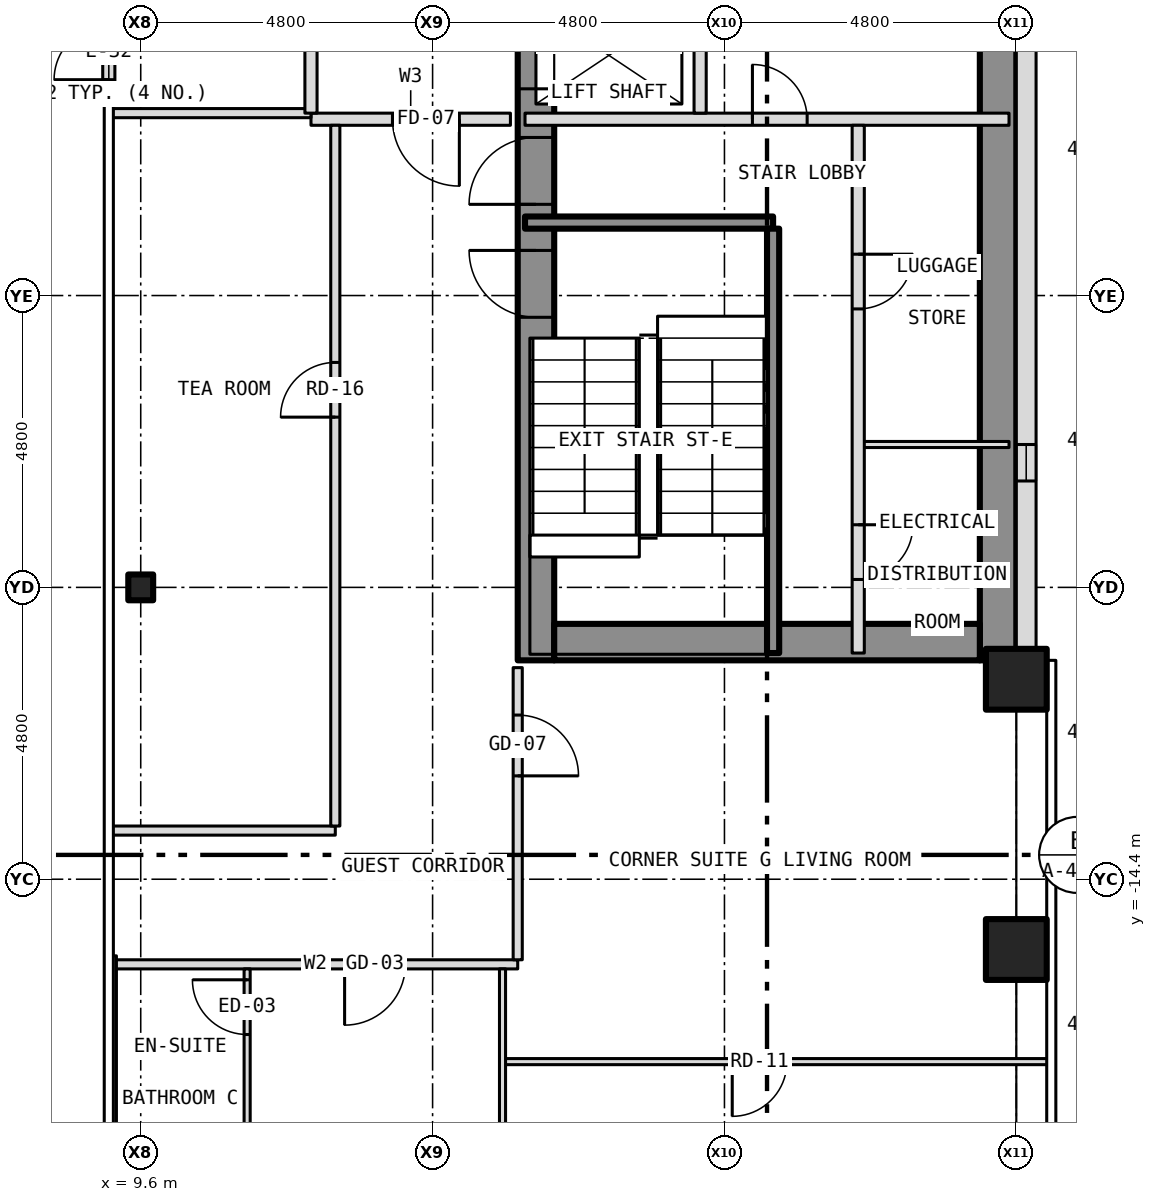
"""IFC4 building model, lengths in metres.
Left out: names, types, materials, properties, quantities, classifications, styles, units other than length and angle.
Written with IfcOpenShell. Run it as: python <this file> out.ifc"""

import sys

from ifc_helpers import new_model, si_unit, direction, frame, frame_2d, origin, origin_2d, place, context, subcontext, project, spatial, rectangle, hollow_rectangle, i_section, extrude, element, fill, save


model = new_model("IFC4")
c1 = context("Model", 3, precision=1e-05, world=origin(), true_north=direction((0.0, 1.0)))
c2 = subcontext(c1, "Body", "Model", "MODEL_VIEW")
j1 = project(units=[si_unit("LENGTHUNIT", "METRE"), si_unit("PLANEANGLEUNIT", "RADIAN")], contexts=[c1])
p1 = place(None, origin())
s1 = spatial("IfcSite", under=j1, at=p1, CompositionType="ELEMENT")
p2 = place(p1, origin())
s2 = spatial("IfcBuilding", under=s1, at=p2, CompositionType="ELEMENT")
p3 = place(p2, frame((0.0, 0.0, 74.0)))
s3 = spatial("IfcBuildingStorey", under=s2, at=p3, CompositionType="ELEMENT", Elevation=74.0)
for number, where, z_axis, x_axis in (
    (1, (24.0, -15.556, -0.15), (0.0, 0.0, 1.0), (1.0, 0.0, 0.0)),
    (2, (24.0, -11.111, -0.15), (0.0, 0.0, 1.0), (1.0, 0.0, 0.0)),
):
    element("IfcColumn", number, at=place(p3, frame(where, z_axis=z_axis, x_axis=x_axis)), inside=s3, PredefinedType="COLUMN", context=c2, shape_type="SweptSolid", body=[
        extrude(hollow_rectangle(XDim=1.0, YDim=1.0, WallThickness=0.06, at=origin_2d()), origin(), (0.0, 0.0, 1.0), 3.5),
    ])
p4 = place(p3, frame((9.6, -9.6, -0.15), z_axis=(0.0, 0.0, 1.0), x_axis=(1.0, 0.0, 0.0)))
e3 = element("IfcColumn", 3, at=p4, inside=s3, PredefinedType="COLUMN", context=c2, shape_type="SweptSolid", body=[
    extrude(i_section(OverallWidth=0.409, OverallDepth=0.424, WebThickness=0.033, FlangeThickness=0.052, at=origin_2d()), origin(), (0.0, 0.0, 1.0), 3.5),
])
p5 = place(p3, frame((16.1, -10.8, 0.0), z_axis=(0.0, 0.0, 1.0), x_axis=(0.0, 1.0, 0.0)))
e4 = element("IfcWall", 4, at=p5, inside=s3, PredefinedType="SHEAR", context=c2, shape_type="SweptSolid", body=[
    extrude(rectangle(XDim=21.6, YDim=0.6, at=frame_2d((10.8, 0.0))), origin(), (0.0, 0.0, 1.0), 3.25),
])
p6 = place(p5, frame((9.4, 0.0, 0.0)))
e5 = element("IfcOpeningElement", 5, at=p6, cuts=e4, PredefinedType="OPENING", context=c2, shape_type="SweptSolid", body=[
    extrude(rectangle(XDim=1.1, YDim=2.1, at=frame_2d((0.55, 1.05))), frame((0.0, 0.312, 0.0), z_axis=(0.0, -1.0, 0.0), x_axis=(1.0, 0.0, 0.0)), (0.0, 0.0, 1.0), 0.624),
])
p7 = place(p5, frame((11.5, 0.0, 0.0)))
e6 = element("IfcOpeningElement", 6, at=p7, cuts=e4, PredefinedType="OPENING", context=c2, shape_type="SweptSolid", body=[
    extrude(rectangle(XDim=1.1, YDim=2.1, at=frame_2d((0.55, 1.05))), frame((0.0, 0.312, 0.0), z_axis=(0.0, -1.0, 0.0), x_axis=(1.0, 0.0, 0.0)), (0.0, 0.0, 1.0), 0.624),
])
p8 = place(p5, frame((13.6, 0.0, 0.0)))
e7 = element("IfcOpeningElement", 7, at=p8, cuts=e4, PredefinedType="OPENING", context=c2, shape_type="SweptSolid", body=[
    extrude(rectangle(XDim=1.1, YDim=2.1, at=frame_2d((0.55, 1.05))), frame((0.0, 0.312, 0.0), z_axis=(0.0, -1.0, 0.0), x_axis=(1.0, 0.0, 0.0)), (0.0, 0.0, 1.0), 0.624),
])
p9 = place(p5, frame((15.7, 0.0, 0.0)))
e8 = element("IfcOpeningElement", 8, at=p9, cuts=e4, PredefinedType="OPENING", context=c2, shape_type="SweptSolid", body=[
    extrude(rectangle(XDim=1.1, YDim=2.1, at=frame_2d((0.55, 1.05))), frame((0.0, 0.312, 0.0), z_axis=(0.0, -1.0, 0.0), x_axis=(1.0, 0.0, 0.0)), (0.0, 0.0, 1.0), 0.624),
])
p10 = place(p5, frame((17.8, 0.0, 0.0)))
e9 = element("IfcOpeningElement", 9, at=p10, cuts=e4, PredefinedType="OPENING", context=c2, shape_type="SweptSolid", body=[
    extrude(rectangle(XDim=1.1, YDim=2.1, at=frame_2d((0.55, 1.05))), frame((0.0, 0.312, 0.0), z_axis=(0.0, -1.0, 0.0), x_axis=(1.0, 0.0, 0.0)), (0.0, 0.0, 1.0), 0.624),
])
p11 = place(p5, frame((5.642, 0.0, 0.0)))
e10 = element("IfcOpeningElement", 10, at=p11, cuts=e4, PredefinedType="OPENING", context=c2, shape_type="SweptSolid", body=[
    extrude(rectangle(XDim=1.1, YDim=2.1, at=frame_2d((0.55, 1.05))), frame((0.0, 0.312, 0.0), z_axis=(0.0, -1.0, 0.0), x_axis=(1.0, 0.0, 0.0)), (0.0, 0.0, 1.0), 0.624),
])
p12 = place(p5, frame((7.5, 0.0, 0.0)))
e11 = element("IfcOpeningElement", 11, at=p12, cuts=e4, PredefinedType="OPENING", context=c2, shape_type="SweptSolid", body=[
    extrude(rectangle(XDim=1.1, YDim=2.1, at=frame_2d((0.55, 1.05))), frame((0.0, 0.312, 0.0), z_axis=(0.0, -1.0, 0.0), x_axis=(1.0, 0.0, 0.0)), (0.0, 0.0, 1.0), 0.624),
])
p13 = place(p3, frame((23.7, -10.8, 0.0), z_axis=(0.0, 0.0, 1.0), x_axis=(0.0, 1.0, 0.0)))
e12 = element("IfcWall", 12, at=p13, inside=s3, PredefinedType="SHEAR", context=c2, shape_type="SweptSolid", body=[
    extrude(rectangle(XDim=21.6, YDim=0.6, at=frame_2d((10.8, 0.0))), origin(), (0.0, 0.0, 1.0), 3.25),
])
p14 = place(p3, frame((16.4, -10.5, 0.0), z_axis=(0.0, 0.0, 1.0), x_axis=(1.0, 0.0, 0.0)))
e13 = element("IfcWall", 13, at=p14, inside=s3, PredefinedType="SHEAR", context=c2, shape_type="SweptSolid", body=[
    extrude(rectangle(XDim=7.0, YDim=0.6, at=frame_2d((3.5, 0.0))), origin(), (0.0, 0.0, 1.0), 3.25),
])
p15 = place(p3, frame((24.163, -10.8, 0.0), z_axis=(0.0, 0.0, 1.0), x_axis=(0.0, 1.0, 0.0)))
e14 = element("IfcWall", 14, at=p15, inside=s3, PredefinedType="SOLIDWALL", context=c2, shape_type="SweptSolid", body=[
    extrude(rectangle(XDim=21.6, YDim=0.325, at=frame_2d((10.8, 0.0))), origin(), (0.0, 0.0, 1.0), 3.5),
])
p16 = place(p15, frame((2.95, 0.0, 1.0)))
e15 = element("IfcOpeningElement", 15, at=p16, cuts=e14, PredefinedType="OPENING", context=c2, shape_type="SweptSolid", body=[
    extrude(rectangle(XDim=0.6, YDim=1.5, at=frame_2d((0.3, 0.75))), frame((0.0, 0.175, 0.0), z_axis=(0.0, -1.0, 0.0), x_axis=(1.0, 0.0, 0.0)), (0.0, 0.0, 1.0), 0.349),
])
p17 = place(p3, frame((9.075, -1.4, 0.0), z_axis=(0.0, 0.0, 1.0), x_axis=(0.0, 1.0, 0.0)))
e16 = element("IfcWall", 16, at=p17, inside=s3, PredefinedType="SOLIDWALL", context=c2, shape_type="SweptSolid", body=[
    extrude(rectangle(XDim=2.8, YDim=0.2, at=frame_2d((1.4, 0.0))), origin(), (0.0, 0.0, 1.0), 3.5),
])
p18 = place(p17, frame((0.15, 0.0, 0.0)))
e17 = element("IfcOpeningElement", 17, at=p18, cuts=e16, PredefinedType="OPENING", context=c2, shape_type="SweptSolid", body=[
    extrude(rectangle(XDim=0.9, YDim=2.1, at=frame_2d((0.45, 1.05))), frame((0.0, 0.112, 0.0), z_axis=(0.0, -1.0, 0.0), x_axis=(1.0, 0.0, 0.0)), (0.0, 0.0, 1.0), 0.224),
])
p19 = place(p17, frame((1.75, 0.0, 0.0)))
e18 = element("IfcOpeningElement", 18, at=p19, cuts=e16, PredefinedType="OPENING", context=c2, shape_type="SweptSolid", body=[
    extrude(rectangle(XDim=0.9, YDim=2.1, at=frame_2d((0.45, 1.05))), frame((0.0, 0.112, 0.0), z_axis=(0.0, -1.0, 0.0), x_axis=(1.0, 0.0, 0.0)), (0.0, 0.0, 1.0), 0.224),
])
p20 = place(p3, frame((15.55, -17.4, 0.0), z_axis=(0.0, 0.0, 1.0), x_axis=(1.0, 0.0, 0.0)))
e19 = element("IfcWall", 19, at=p20, inside=s3, PredefinedType="PARTITIONING", context=c2, shape_type="SweptSolid", body=[
    extrude(rectangle(XDim=8.98, YDim=0.1, at=frame_2d((4.49, 0.0))), origin(), (0.0, 0.0, 1.0), 3.35),
])
p21 = place(p20, frame((3.778, 0.0, 0.0)))
e20 = element("IfcOpeningElement", 20, at=p21, cuts=e19, PredefinedType="OPENING", context=c2, shape_type="SweptSolid", body=[
    extrude(rectangle(XDim=0.9, YDim=2.1, at=frame_2d((0.45, 1.05))), frame((0.0, 0.062, 0.0), z_axis=(0.0, -1.0, 0.0), x_axis=(1.0, 0.0, 0.0)), (0.0, 0.0, 1.0), 0.124),
])
p22 = place(p3, frame((9.15, -15.8, 0.0), z_axis=(0.0, 0.0, 1.0), x_axis=(1.0, 0.0, 0.0)))
e21 = element("IfcWall", 21, at=p22, inside=s3, PredefinedType="PARTITIONING", context=c2, shape_type="SweptSolid", body=[
    extrude(rectangle(XDim=6.65, YDim=0.15, at=frame_2d((3.325, 0.0))), origin(), (0.0, 0.0, 1.0), 3.35),
])
p23 = place(p22, frame((3.803, 0.0, 0.0)))
e22 = element("IfcOpeningElement", 22, at=p23, cuts=e21, PredefinedType="OPENING", context=c2, shape_type="SweptSolid", body=[
    extrude(rectangle(XDim=1.0, YDim=2.1, at=frame_2d((0.5, 1.05))), frame((0.0, 0.087, 0.0), z_axis=(0.0, -1.0, 0.0), x_axis=(1.0, 0.0, 0.0)), (0.0, 0.0, 1.0), 0.174),
])
p24 = place(p3, frame((9.12, -13.6, 0.0), z_axis=(0.0, 0.0, 1.0), x_axis=(1.0, 0.0, 0.0)))
e23 = element("IfcWall", 23, at=p24, inside=s3, PredefinedType="PARTITIONING", context=c2, shape_type="SweptSolid", body=[
    extrude(rectangle(XDim=3.68, YDim=0.15, at=frame_2d((1.84, 0.0))), origin(), (0.0, 0.0, 1.0), 3.35),
])
p25 = place(p3, frame((21.4, -7.25, 0.0), z_axis=(0.0, 0.0, 1.0), x_axis=(1.0, 0.0, 0.0)))
e24 = element("IfcWall", 24, at=p25, inside=s3, PredefinedType="PARTITIONING", context=c2, shape_type="SweptSolid", body=[
    extrude(rectangle(XDim=2.48, YDim=0.1, at=frame_2d((1.24, 0.0))), origin(), (0.0, 0.0, 1.0), 3.25),
])
p26 = place(p3, frame((15.92, -3.6, 0.0), z_axis=(0.0, 0.0, 1.0), x_axis=(1.0, 0.0, 0.0)))
e25 = element("IfcWall", 25, at=p26, inside=s3, PredefinedType="SHEAR", context=c2, shape_type="SweptSolid", body=[
    extrude(rectangle(XDim=4.08, YDim=0.2, at=frame_2d((2.04, 0.0))), origin(), (0.0, 0.0, 1.0), 3.25),
])
p27 = place(p3, frame((12.4, -1.9, 0.0), z_axis=(0.0, 0.0, 1.0), x_axis=(1.0, 0.0, 0.0)))
e26 = element("IfcWall", 26, at=p27, inside=s3, PredefinedType="PARTITIONING", context=c2, shape_type="SweptSolid", body=[
    extrude(rectangle(XDim=3.28, YDim=0.2, at=frame_2d((1.64, 0.0))), origin(), (0.0, 0.0, 1.0), 3.35),
])
p28 = place(p27, frame((1.34, 0.0, 0.0)))
e27 = element("IfcOpeningElement", 27, at=p28, cuts=e26, PredefinedType="OPENING", context=c2, shape_type="SweptSolid", body=[
    extrude(rectangle(XDim=1.1, YDim=2.1, at=frame_2d((0.55, 1.05))), frame((0.0, 0.112, 0.0), z_axis=(0.0, -1.0, 0.0), x_axis=(1.0, 0.0, 0.0)), (0.0, 0.0, 1.0), 0.224),
])
p29 = place(p3, frame((15.92, -1.9, 0.0), z_axis=(0.0, 0.0, 1.0), x_axis=(1.0, 0.0, 0.0)))
e28 = element("IfcWall", 28, at=p29, inside=s3, PredefinedType="PARTITIONING", context=c2, shape_type="SweptSolid", body=[
    extrude(rectangle(XDim=7.96, YDim=0.2, at=frame_2d((3.98, 0.0))), origin(), (0.0, 0.0, 1.0), 3.25),
])
p30 = place(p29, frame((3.74, 0.0, 0.0)))
e29 = element("IfcOpeningElement", 29, at=p30, cuts=e28, PredefinedType="OPENING", context=c2, shape_type="SweptSolid", body=[
    extrude(rectangle(XDim=0.9, YDim=2.1, at=frame_2d((0.45, 1.05))), frame((0.0, 0.112, 0.0), z_axis=(0.0, -1.0, 0.0), x_axis=(1.0, 0.0, 0.0)), (0.0, 0.0, 1.0), 0.224),
])
p31 = place(p3, frame((9.12, -1.8, 0.0), z_axis=(0.0, 0.0, 1.0), x_axis=(1.0, 0.0, 0.0)))
e30 = element("IfcWall", 30, at=p31, inside=s3, PredefinedType="PARTITIONING", context=c2, shape_type="SweptSolid", body=[
    extrude(rectangle(XDim=3.28, YDim=0.15, at=frame_2d((1.64, 0.0))), origin(), (0.0, 0.0, 1.0), 3.35),
])
p32 = place(p3, frame((9.15, -19.14, 0.0), z_axis=(0.0, 0.0, 1.0), x_axis=(0.0, 1.0, 0.0)))
e31 = element("IfcWall", 31, at=p32, inside=s3, PredefinedType="PARTITIONING", context=c2, shape_type="SweptSolid", body=[
    extrude(rectangle(XDim=3.48, YDim=0.1, at=frame_2d((1.74, 0.0))), origin(), (0.0, 0.0, 1.0), 2.733),
])
p33 = place(p3, frame((11.35, -18.95, 0.0), z_axis=(0.0, 0.0, 1.0), x_axis=(0.0, 1.0, 0.0)))
e32 = element("IfcWall", 32, at=p33, inside=s3, PredefinedType="PARTITIONING", context=c2, shape_type="SweptSolid", body=[
    extrude(rectangle(XDim=3.075, YDim=0.1, at=frame_2d((1.538, 0.0))), origin(), (0.0, 0.0, 1.0), 3.35),
])
p34 = place(p33, frame((1.996, 0.0, 0.0)))
e33 = element("IfcOpeningElement", 33, at=p34, cuts=e32, PredefinedType="OPENING", context=c2, shape_type="SweptSolid", body=[
    extrude(rectangle(XDim=0.9, YDim=2.1, at=frame_2d((0.45, 1.05))), frame((0.0, 0.062, 0.0), z_axis=(0.0, -1.0, 0.0), x_axis=(1.0, 0.0, 0.0)), (0.0, 0.0, 1.0), 0.124),
])
p35 = place(p3, frame((12.4, -1.8, 0.0), z_axis=(0.0, 0.0, 1.0), x_axis=(0.0, 1.0, 0.0)))
e34 = element("IfcWall", 34, at=p35, inside=s3, PredefinedType="PARTITIONING", context=c2, shape_type="SweptSolid", body=[
    extrude(rectangle(XDim=4.0, YDim=0.2, at=frame_2d((2.0, 0.0))), origin(), (0.0, 0.0, 1.0), 3.35),
])
p36 = place(p35, frame((1.25, 0.0, 0.0)))
e35 = element("IfcOpeningElement", 35, at=p36, cuts=e34, PredefinedType="OPENING", context=c2, shape_type="SweptSolid", body=[
    extrude(rectangle(XDim=1.1, YDim=2.1, at=frame_2d((0.55, 1.05))), frame((0.0, 0.112, 0.0), z_axis=(0.0, -1.0, 0.0), x_axis=(1.0, 0.0, 0.0)), (0.0, 0.0, 1.0), 0.224),
])
p37 = place(p3, frame((12.8, -13.525, 0.0), z_axis=(0.0, 0.0, 1.0), x_axis=(0.0, 1.0, 0.0)))
e36 = element("IfcWall", 36, at=p37, inside=s3, PredefinedType="PARTITIONING", context=c2, shape_type="SweptSolid", body=[
    extrude(rectangle(XDim=11.525, YDim=0.15, at=frame_2d((5.762, 0.0))), origin(), (0.0, 0.0, 1.0), 3.35),
])
p38 = place(p37, frame((6.725, 0.0, 0.0)))
e37 = element("IfcOpeningElement", 37, at=p38, cuts=e36, PredefinedType="OPENING", context=c2, shape_type="SweptSolid", body=[
    extrude(rectangle(XDim=0.9, YDim=2.1, at=frame_2d((0.45, 1.05))), frame((0.0, 0.087, 0.0), z_axis=(0.0, -1.0, 0.0), x_axis=(1.0, 0.0, 0.0)), (0.0, 0.0, 1.0), 0.174),
])
p39 = place(p3, frame((15.55, -23.88, 0.0), z_axis=(0.0, 0.0, 1.0), x_axis=(0.0, 1.0, 0.0)))
e38 = element("IfcWall", 38, at=p39, inside=s3, PredefinedType="PARTITIONING", context=c2, shape_type="SweptSolid", body=[
    extrude(rectangle(XDim=8.005, YDim=0.1, at=frame_2d((4.002, 0.0))), origin(), (0.0, 0.0, 1.0), 3.35),
])
p40 = place(p3, frame((15.8, -15.725, 0.0), z_axis=(0.0, 0.0, 1.0), x_axis=(0.0, 1.0, 0.0)))
e39 = element("IfcWall", 39, at=p40, inside=s3, PredefinedType="PARTITIONING", context=c2, shape_type="SweptSolid", body=[
    extrude(rectangle(XDim=4.805, YDim=0.15, at=frame_2d((2.403, 0.0))), origin(), (0.0, 0.0, 1.0), 3.35),
])
p41 = place(p40, frame((3.025, 0.0, 0.0)))
e40 = element("IfcOpeningElement", 40, at=p41, cuts=e39, PredefinedType="OPENING", context=c2, shape_type="SweptSolid", body=[
    extrude(rectangle(XDim=1.0, YDim=2.1, at=frame_2d((0.5, 1.05))), frame((0.0, 0.087, 0.0), z_axis=(0.0, -1.0, 0.0), x_axis=(1.0, 0.0, 0.0)), (0.0, 0.0, 1.0), 0.174),
])
p42 = place(p3, frame((18.8, -1.8, 0.0), z_axis=(0.0, 0.0, 1.0), x_axis=(0.0, 1.0, 0.0)))
e41 = element("IfcWall", 41, at=p42, inside=s3, PredefinedType="PARTITIONING", context=c2, shape_type="SweptSolid", body=[
    extrude(rectangle(XDim=12.48, YDim=0.2, at=frame_2d((6.24, 0.0))), origin(), (0.0, 0.0, 1.0), 3.25),
])
p43 = place(p3, frame((20.0, -10.68, 0.0), z_axis=(0.0, 0.0, 1.0), x_axis=(0.0, 1.0, 0.0)))
e42 = element("IfcWall", 42, at=p43, inside=s3, PredefinedType="SHEAR", context=c2, shape_type="SweptSolid", body=[
    extrude(rectangle(XDim=6.98, YDim=0.2, at=frame_2d((3.49, 0.0))), origin(), (0.0, 0.0, 1.0), 3.25),
])
p44 = place(p3, frame((21.4, -10.68, 0.0), z_axis=(0.0, 0.0, 1.0), x_axis=(0.0, 1.0, 0.0)))
e43 = element("IfcWall", 43, at=p44, inside=s3, PredefinedType="PARTITIONING", context=c2, shape_type="SweptSolid", body=[
    extrude(rectangle(XDim=8.68, YDim=0.2, at=frame_2d((4.34, 0.0))), origin(), (0.0, 0.0, 1.0), 3.25),
])
p45 = place(p44, frame((1.21, 0.0, 0.0)))
e44 = element("IfcOpeningElement", 44, at=p45, cuts=e43, PredefinedType="OPENING", context=c2, shape_type="SweptSolid", body=[
    extrude(rectangle(XDim=0.9, YDim=2.1, at=frame_2d((0.45, 1.05))), frame((0.0, 0.112, 0.0), z_axis=(0.0, -1.0, 0.0), x_axis=(1.0, 0.0, 0.0)), (0.0, 0.0, 1.0), 0.224),
])
p46 = place(p44, frame((5.66, 0.0, 0.0)))
e45 = element("IfcOpeningElement", 45, at=p46, cuts=e43, PredefinedType="OPENING", context=c2, shape_type="SweptSolid", body=[
    extrude(rectangle(XDim=0.9, YDim=2.1, at=frame_2d((0.45, 1.05))), frame((0.0, 0.112, 0.0), z_axis=(0.0, -1.0, 0.0), x_axis=(1.0, 0.0, 0.0)), (0.0, 0.0, 1.0), 0.224),
])
p47 = place(p16, origin())
e46 = element("IfcWindow", 46, at=p47, inside=s3, PartitioningType="SINGLE_PANEL", PredefinedType="WINDOW", context=c2, shape_type="SweptSolid", body=[
    extrude(rectangle(XDim=0.6, YDim=1.5, at=frame_2d((0.3, 0.75))), frame((0.0, -0.073, 0.0), z_axis=(0.0, -1.0, 0.0), x_axis=(1.0, 0.0, 0.0)), (0.0, 0.0, 1.0), 0.06),
])
fill(e15, e46)
p48 = place(p18, origin())
e47 = element("IfcDoor", 47, at=p48, inside=s3, OperationType="SINGLE_SWING_LEFT", PredefinedType="DOOR", context=c2, shape_type="SweptSolid", body=[
    extrude(rectangle(XDim=0.9, YDim=2.1, at=frame_2d((0.45, 1.05))), frame((0.0, 0.025, 0.0), z_axis=(0.0, -1.0, 0.0), x_axis=(1.0, 0.0, 0.0)), (0.0, 0.0, 1.0), 0.05),
])
fill(e17, e47)
p49 = place(p6, origin())
e48 = element("IfcDoor", 48, at=p49, inside=s3, OperationType="SLIDING_TO_LEFT", PredefinedType="DOOR", context=c2, shape_type="SweptSolid", body=[
    extrude(rectangle(XDim=1.1, YDim=2.1, at=frame_2d((0.55, 1.05))), frame((0.0, 0.025, 0.0), z_axis=(0.0, -1.0, 0.0), x_axis=(1.0, 0.0, 0.0)), (0.0, 0.0, 1.0), 0.05),
])
fill(e5, e48)
p50 = place(p11, origin())
e49 = element("IfcDoor", 49, at=p50, inside=s3, OperationType="SINGLE_SWING_RIGHT", PredefinedType="DOOR", context=c2, shape_type="SweptSolid", body=[
    extrude(rectangle(XDim=1.1, YDim=2.1, at=frame_2d((0.55, 1.05))), frame((0.0, 0.025, 0.0), z_axis=(0.0, -1.0, 0.0), x_axis=(1.0, 0.0, 0.0)), (0.0, 0.0, 1.0), 0.05),
])
fill(e10, e49)
p51 = place(p12, origin())
e50 = element("IfcDoor", 50, at=p51, inside=s3, OperationType="SINGLE_SWING_LEFT", PredefinedType="DOOR", context=c2, shape_type="SweptSolid", body=[
    extrude(rectangle(XDim=1.1, YDim=2.1, at=frame_2d((0.55, 1.05))), frame((0.0, 0.025, 0.0), z_axis=(0.0, -1.0, 0.0), x_axis=(1.0, 0.0, 0.0)), (0.0, 0.0, 1.0), 0.05),
])
fill(e11, e50)
p52 = place(p45, origin())
e51 = element("IfcDoor", 51, at=p52, inside=s3, OperationType="SINGLE_SWING_RIGHT", PredefinedType="DOOR", context=c2, shape_type="SweptSolid", body=[
    extrude(rectangle(XDim=0.9, YDim=2.1, at=frame_2d((0.45, 1.05))), frame((0.0, 0.025, 0.0), z_axis=(0.0, -1.0, 0.0), x_axis=(1.0, 0.0, 0.0)), (0.0, 0.0, 1.0), 0.05),
])
fill(e44, e51)
p53 = place(p46, origin())
e52 = element("IfcDoor", 52, at=p53, inside=s3, OperationType="SINGLE_SWING_RIGHT", PredefinedType="DOOR", context=c2, shape_type="SweptSolid", body=[
    extrude(rectangle(XDim=0.9, YDim=2.1, at=frame_2d((0.45, 1.05))), frame((0.0, 0.025, 0.0), z_axis=(0.0, -1.0, 0.0), x_axis=(1.0, 0.0, 0.0)), (0.0, 0.0, 1.0), 0.05),
])
fill(e45, e52)
p54 = place(p30, origin())
e53 = element("IfcDoor", 53, at=p54, inside=s3, OperationType="SINGLE_SWING_LEFT", PredefinedType="DOOR", context=c2, shape_type="SweptSolid", body=[
    extrude(rectangle(XDim=0.9, YDim=2.1, at=frame_2d((0.45, 1.05))), frame((0.0, 0.025, 0.0), z_axis=(0.0, -1.0, 0.0), x_axis=(1.0, 0.0, 0.0)), (0.0, 0.0, 1.0), 0.05),
])
fill(e29, e53)
p55 = place(p28, origin())
e54 = element("IfcDoor", 54, at=p55, inside=s3, OperationType="SINGLE_SWING_RIGHT", PredefinedType="DOOR", context=c2, shape_type="SweptSolid", body=[
    extrude(rectangle(XDim=1.1, YDim=2.1, at=frame_2d((0.55, 1.05))), frame((0.0, 0.025, 0.0), z_axis=(0.0, -1.0, 0.0), x_axis=(1.0, 0.0, 0.0)), (0.0, 0.0, 1.0), 0.05),
])
fill(e27, e54)
p56 = place(p23, origin())
e55 = element("IfcDoor", 55, at=p56, inside=s3, OperationType="SINGLE_SWING_LEFT", PredefinedType="DOOR", context=c2, shape_type="SweptSolid", body=[
    extrude(rectangle(XDim=1.0, YDim=2.1, at=frame_2d((0.5, 1.05))), frame((0.0, 0.025, 0.0), z_axis=(0.0, -1.0, 0.0), x_axis=(1.0, 0.0, 0.0)), (0.0, 0.0, 1.0), 0.05),
])
fill(e22, e55)
p57 = place(p34, origin())
e56 = element("IfcDoor", 56, at=p57, inside=s3, OperationType="SINGLE_SWING_RIGHT", PredefinedType="DOOR", context=c2, shape_type="SweptSolid", body=[
    extrude(rectangle(XDim=0.9, YDim=2.1, at=frame_2d((0.45, 1.05))), frame((0.0, 0.025, 0.0), z_axis=(0.0, -1.0, 0.0), x_axis=(1.0, 0.0, 0.0)), (0.0, 0.0, 1.0), 0.05),
])
fill(e33, e56)
p58 = place(p41, origin())
e57 = element("IfcDoor", 57, at=p58, inside=s3, OperationType="SINGLE_SWING_LEFT", PredefinedType="DOOR", context=c2, shape_type="SweptSolid", body=[
    extrude(rectangle(XDim=1.0, YDim=2.1, at=frame_2d((0.5, 1.05))), frame((0.0, 0.025, 0.0), z_axis=(0.0, -1.0, 0.0), x_axis=(1.0, 0.0, 0.0)), (0.0, 0.0, 1.0), 0.05),
])
fill(e40, e57)
p59 = place(p21, origin())
e58 = element("IfcDoor", 58, at=p59, inside=s3, OperationType="SINGLE_SWING_LEFT", PredefinedType="DOOR", context=c2, shape_type="SweptSolid", body=[
    extrude(rectangle(XDim=0.9, YDim=2.1, at=frame_2d((0.45, 1.05))), frame((0.0, 0.025, 0.0), z_axis=(0.0, -1.0, 0.0), x_axis=(1.0, 0.0, 0.0)), (0.0, 0.0, 1.0), 0.05),
])
fill(e20, e58)
p60 = place(p38, origin())
e59 = element("IfcDoor", 59, at=p60, inside=s3, OperationType="SINGLE_SWING_LEFT", PredefinedType="DOOR", context=c2, shape_type="SweptSolid", body=[
    extrude(rectangle(XDim=0.9, YDim=2.1, at=frame_2d((0.45, 1.05))), frame((0.0, 0.025, 0.0), z_axis=(0.0, -1.0, 0.0), x_axis=(1.0, 0.0, 0.0)), (0.0, 0.0, 1.0), 0.05),
])
fill(e37, e59)
save(model, sys.argv[1])
